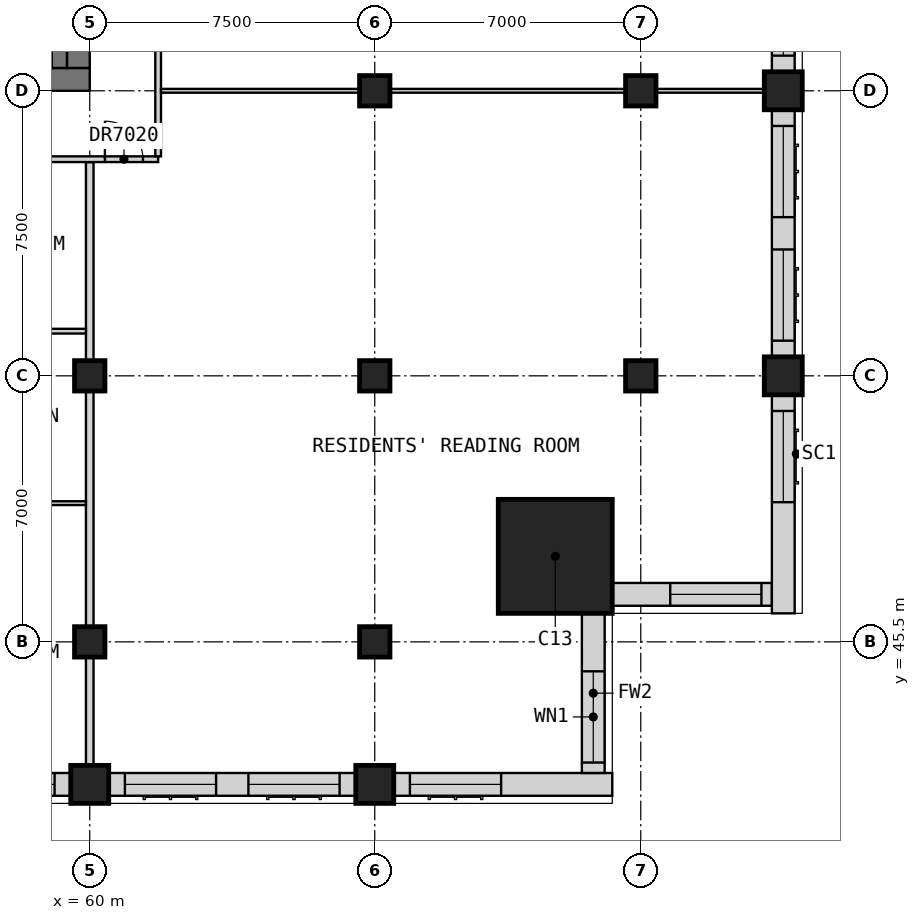
"""IFC4 building model, lengths in metres.
Left out: names, types, materials, properties, quantities, classifications, styles, units other than length and angle.
Written with IfcOpenShell. Run it as: python <this file> out.ifc"""

import sys

from ifc_helpers import new_model, si_unit, direction, frame, frame_2d, origin, origin_2d, place, context, subcontext, project, spatial, rectangle, extrude, element, fill, save


model = new_model("IFC4")
c1 = context("Model", 3, precision=1e-05, world=origin(), true_north=direction((0.0, 1.0)))
c2 = subcontext(c1, "Body", "Model", "MODEL_VIEW")
j1 = project(units=[si_unit("LENGTHUNIT", "METRE"), si_unit("PLANEANGLEUNIT", "RADIAN")], contexts=[c1])
p1 = place(None, origin())
s1 = spatial("IfcSite", under=j1, at=p1, CompositionType="ELEMENT")
p2 = place(p1, origin())
s2 = spatial("IfcBuilding", under=s1, at=p2, CompositionType="ELEMENT")
p3 = place(p2, frame((0.0, 0.0, 230.2)))
s3 = spatial("IfcBuildingStorey", under=s2, at=p3, CompositionType="ELEMENT", Elevation=230.2)
for number, where, z_axis, x_axis in (
    (1, (60.0, 41.75, 0.0), (0.0, 0.0, 1.0), (1.0, 0.0, 0.0)),
    (2, (67.5, 41.75, 0.0), (0.0, 0.0, 1.0), (1.0, 0.0, 0.0)),
    (3, (78.25, 52.5, 0.0), (0.0, 0.0, 1.0), (1.0, 0.0, 0.0)),
    (4, (78.25, 60.0, 0.0), (0.0, 0.0, 1.0), (1.0, 0.0, 0.0)),
):
    element("IfcColumn", number, at=place(p3, frame(where, z_axis=z_axis, x_axis=x_axis)), inside=s3, PredefinedType="COLUMN", context=c2, shape_type="SweptSolid", body=[
        extrude(rectangle(XDim=1.0, YDim=1.0, at=origin_2d()), origin(), (0.0, 0.0, 1.0), 3.5),
    ])
for number, where, z_axis, x_axis in (
    (5, (60.0, 45.5, 0.0), (0.0, 0.0, 1.0), (1.0, 0.0, 0.0)),
    (6, (60.0, 52.5, 0.0), (0.0, 0.0, 1.0), (1.0, 0.0, 0.0)),
    (7, (67.5, 45.5, 0.0), (0.0, 0.0, 1.0), (1.0, 0.0, 0.0)),
    (8, (67.5, 52.5, 0.0), (0.0, 0.0, 1.0), (1.0, 0.0, 0.0)),
    (9, (67.5, 60.0, 0.0), (0.0, 0.0, 1.0), (1.0, 0.0, 0.0)),
    (10, (74.5, 52.5, 0.0), (0.0, 0.0, 1.0), (1.0, 0.0, 0.0)),
    (11, (74.5, 60.0, 0.0), (0.0, 0.0, 1.0), (1.0, 0.0, 0.0)),
):
    element("IfcColumn", number, at=place(p3, frame(where, z_axis=z_axis, x_axis=x_axis)), inside=s3, PredefinedType="COLUMN", context=c2, shape_type="SweptSolid", body=[
        extrude(rectangle(XDim=0.8, YDim=0.8, at=origin_2d()), origin(), (0.0, 0.0, 1.0), 3.5),
    ])
p4 = place(p3, frame((72.25, 47.75, 0.0), z_axis=(0.0, 0.0, 1.0), x_axis=(1.0, 0.0, 0.0)))
e12 = element("IfcColumn", 12, at=p4, inside=s3, PredefinedType="COLUMN", context=c2, shape_type="SweptSolid", body=[
    extrude(rectangle(XDim=3.0, YDim=3.0, at=origin_2d()), origin(), (0.0, 0.0, 1.0), 3.5),
])
p5 = place(p3, frame((30.0, 60.3, 0.0), z_axis=(0.0, 0.0, 1.0), x_axis=(1.0, 0.0, 0.0)))
e13 = element("IfcWall", 13, at=p5, inside=s3, PredefinedType="SHEAR", context=c2, shape_type="SweptSolid", body=[
    extrude(rectangle(XDim=30.0, YDim=0.6, at=frame_2d((15.0, 0.0))), origin(), (0.0, 0.0, 1.0), 3.5),
])
p6 = place(p5, frame((21.9, 0.0, 0.0)))
e14 = element("IfcOpeningElement", 14, at=p6, cuts=e13, PredefinedType="OPENING", context=c2, shape_type="SweptSolid", body=[
    extrude(rectangle(XDim=1.8, YDim=2.1, at=frame_2d((0.9, 1.05))), frame((0.0, 0.31, 0.0), z_axis=(0.0, -1.0, 0.0), x_axis=(1.0, 0.0, 0.0)), (0.0, 0.0, 1.0), 0.62),
])
p7 = place(p5, frame((26.5, 0.0, 0.0)))
e15 = element("IfcOpeningElement", 15, at=p7, cuts=e13, PredefinedType="OPENING", context=c2, shape_type="SweptSolid", body=[
    extrude(rectangle(XDim=1.2, YDim=2.1, at=frame_2d((0.6, 1.05))), frame((0.0, 0.31, 0.0), z_axis=(0.0, -1.0, 0.0), x_axis=(1.0, 0.0, 0.0)), (0.0, 0.0, 1.0), 0.62),
])
p8 = place(p3, frame((59.7, 60.6, 0.0), z_axis=(0.0, 0.0, 1.0), x_axis=(0.0, 1.0, 0.0)))
e16 = element("IfcWall", 16, at=p8, inside=s3, PredefinedType="SHEAR", context=c2, shape_type="SweptSolid", body=[
    extrude(rectangle(XDim=21.3, YDim=0.6, at=frame_2d((10.65, 0.0))), origin(), (0.0, 0.0, 1.0), 3.5),
])
p9 = place(p8, frame((14.9, 0.0, 0.0)))
e17 = element("IfcOpeningElement", 17, at=p9, cuts=e16, PredefinedType="OPENING", context=c2, shape_type="SweptSolid", body=[
    extrude(rectangle(XDim=1.8, YDim=2.1, at=frame_2d((0.9, 1.05))), frame((0.0, 0.31, 0.0), z_axis=(0.0, -1.0, 0.0), x_axis=(1.0, 0.0, 0.0)), (0.0, 0.0, 1.0), 0.62),
])
p10 = place(p3, frame((53.0, 41.75, 0.0), z_axis=(0.0, 0.0, 1.0), x_axis=(1.0, 0.0, 0.0)))
e18 = element("IfcWall", 18, at=p10, inside=s3, PredefinedType="SOLIDWALL", context=c2, shape_type="SweptSolid", body=[
    extrude(rectangle(XDim=6.5, YDim=0.6, at=frame_2d((3.25, 0.0))), origin(), (0.0, 0.0, 1.0), 2.75),
])
p11 = place(p10, frame((0.425, 0.0, 0.8)))
e19 = element("IfcOpeningElement", 19, at=p11, cuts=e18, PredefinedType="OPENING", context=c2, shape_type="SweptSolid", body=[
    extrude(rectangle(XDim=2.4, YDim=1.8, at=frame_2d((1.2, 0.9))), frame((0.0, 0.31, 0.0), z_axis=(0.0, -1.0, 0.0), x_axis=(1.0, 0.0, 0.0)), (0.0, 0.0, 1.0), 0.62),
])
p12 = place(p10, frame((3.675, 0.0, 0.8)))
e20 = element("IfcOpeningElement", 20, at=p12, cuts=e18, PredefinedType="OPENING", context=c2, shape_type="SweptSolid", body=[
    extrude(rectangle(XDim=2.4, YDim=1.8, at=frame_2d((1.2, 0.9))), frame((0.0, 0.31, 0.0), z_axis=(0.0, -1.0, 0.0), x_axis=(1.0, 0.0, 0.0)), (0.0, 0.0, 1.0), 0.62),
])
p13 = place(p3, frame((60.5, 41.75, 0.0), z_axis=(0.0, 0.0, 1.0), x_axis=(1.0, 0.0, 0.0)))
e21 = element("IfcWall", 21, at=p13, inside=s3, PredefinedType="SOLIDWALL", context=c2, shape_type="SweptSolid", body=[
    extrude(rectangle(XDim=6.5, YDim=0.6, at=frame_2d((3.25, 0.0))), origin(), (0.0, 0.0, 1.0), 2.75),
])
p14 = place(p13, frame((0.425, 0.0, 0.8)))
e22 = element("IfcOpeningElement", 22, at=p14, cuts=e21, PredefinedType="OPENING", context=c2, shape_type="SweptSolid", body=[
    extrude(rectangle(XDim=2.4, YDim=1.8, at=frame_2d((1.2, 0.9))), frame((0.0, 0.31, 0.0), z_axis=(0.0, -1.0, 0.0), x_axis=(1.0, 0.0, 0.0)), (0.0, 0.0, 1.0), 0.62),
])
p15 = place(p13, frame((3.675, 0.0, 0.8)))
e23 = element("IfcOpeningElement", 23, at=p15, cuts=e21, PredefinedType="OPENING", context=c2, shape_type="SweptSolid", body=[
    extrude(rectangle(XDim=2.4, YDim=1.8, at=frame_2d((1.2, 0.9))), frame((0.0, 0.31, 0.0), z_axis=(0.0, -1.0, 0.0), x_axis=(1.0, 0.0, 0.0)), (0.0, 0.0, 1.0), 0.62),
])
p16 = place(p3, frame((68.0, 41.75, 0.0), z_axis=(0.0, 0.0, 1.0), x_axis=(1.0, 0.0, 0.0)))
e24 = element("IfcWall", 24, at=p16, inside=s3, PredefinedType="SOLIDWALL", context=c2, shape_type="SweptSolid", body=[
    extrude(rectangle(XDim=5.75, YDim=0.6, at=frame_2d((2.875, 0.0))), origin(), (0.0, 0.0, 1.0), 2.75),
])
p17 = place(p16, frame((0.425, 0.0, 0.8)))
e25 = element("IfcOpeningElement", 25, at=p17, cuts=e24, PredefinedType="OPENING", context=c2, shape_type="SweptSolid", body=[
    extrude(rectangle(XDim=2.4, YDim=1.8, at=frame_2d((1.2, 0.9))), frame((0.0, 0.31, 0.0), z_axis=(0.0, -1.0, 0.0), x_axis=(1.0, 0.0, 0.0)), (0.0, 0.0, 1.0), 0.62),
])
p18 = place(p3, frame((73.25, 42.05, 0.0), z_axis=(0.0, 0.0, 1.0), x_axis=(0.0, 1.0, 0.0)))
e26 = element("IfcWall", 26, at=p18, inside=s3, PredefinedType="SOLIDWALL", context=c2, shape_type="SweptSolid", body=[
    extrude(rectangle(XDim=4.2, YDim=0.6, at=frame_2d((2.1, 0.0))), origin(), (0.0, 0.0, 1.0), 3.25),
])
p19 = place(p18, frame((0.275, 0.0, 0.8)))
e27 = element("IfcOpeningElement", 27, at=p19, cuts=e26, PredefinedType="OPENING", context=c2, shape_type="SweptSolid", body=[
    extrude(rectangle(XDim=2.4, YDim=1.8, at=frame_2d((1.2, 0.9))), frame((0.0, 0.31, 0.0), z_axis=(0.0, -1.0, 0.0), x_axis=(1.0, 0.0, 0.0)), (0.0, 0.0, 1.0), 0.62),
])
p20 = place(p3, frame((73.75, 46.75, 0.0), z_axis=(0.0, 0.0, 1.0), x_axis=(1.0, 0.0, 0.0)))
e28 = element("IfcWall", 28, at=p20, inside=s3, PredefinedType="SOLIDWALL", context=c2, shape_type="SweptSolid", body=[
    extrude(rectangle(XDim=4.2, YDim=0.6, at=frame_2d((2.1, 0.0))), origin(), (0.0, 0.0, 1.0), 3.25),
])
p21 = place(p20, frame((1.525, 0.0, 0.8)))
e29 = element("IfcOpeningElement", 29, at=p21, cuts=e28, PredefinedType="OPENING", context=c2, shape_type="SweptSolid", body=[
    extrude(rectangle(XDim=2.4, YDim=1.8, at=frame_2d((1.2, 0.9))), frame((0.0, 0.31, 0.0), z_axis=(0.0, -1.0, 0.0), x_axis=(1.0, 0.0, 0.0)), (0.0, 0.0, 1.0), 0.62),
])
p22 = place(p3, frame((78.25, 46.25, 0.0), z_axis=(0.0, 0.0, 1.0), x_axis=(0.0, 1.0, 0.0)))
e30 = element("IfcWall", 30, at=p22, inside=s3, PredefinedType="SOLIDWALL", context=c2, shape_type="SweptSolid", body=[
    extrude(rectangle(XDim=5.75, YDim=0.6, at=frame_2d((2.875, 0.0))), origin(), (0.0, 0.0, 1.0), 2.75),
])
p23 = place(p22, frame((2.925, 0.0, 0.8)))
e31 = element("IfcOpeningElement", 31, at=p23, cuts=e30, PredefinedType="OPENING", context=c2, shape_type="SweptSolid", body=[
    extrude(rectangle(XDim=2.4, YDim=1.8, at=frame_2d((1.2, 0.9))), frame((0.0, 0.31, 0.0), z_axis=(0.0, -1.0, 0.0), x_axis=(1.0, 0.0, 0.0)), (0.0, 0.0, 1.0), 0.62),
])
p24 = place(p3, frame((78.25, 53.0, 0.0), z_axis=(0.0, 0.0, 1.0), x_axis=(0.0, 1.0, 0.0)))
e32 = element("IfcWall", 32, at=p24, inside=s3, PredefinedType="SOLIDWALL", context=c2, shape_type="SweptSolid", body=[
    extrude(rectangle(XDim=6.5, YDim=0.6, at=frame_2d((3.25, 0.0))), origin(), (0.0, 0.0, 1.0), 2.75),
])
p25 = place(p24, frame((0.425, 0.0, 0.8)))
e33 = element("IfcOpeningElement", 33, at=p25, cuts=e32, PredefinedType="OPENING", context=c2, shape_type="SweptSolid", body=[
    extrude(rectangle(XDim=2.4, YDim=1.8, at=frame_2d((1.2, 0.9))), frame((0.0, 0.31, 0.0), z_axis=(0.0, -1.0, 0.0), x_axis=(1.0, 0.0, 0.0)), (0.0, 0.0, 1.0), 0.62),
])
p26 = place(p24, frame((3.675, 0.0, 0.8)))
e34 = element("IfcOpeningElement", 34, at=p26, cuts=e32, PredefinedType="OPENING", context=c2, shape_type="SweptSolid", body=[
    extrude(rectangle(XDim=2.4, YDim=1.8, at=frame_2d((1.2, 0.9))), frame((0.0, 0.31, 0.0), z_axis=(0.0, -1.0, 0.0), x_axis=(1.0, 0.0, 0.0)), (0.0, 0.0, 1.0), 0.62),
])
p27 = place(p3, frame((78.25, 60.5, 0.0), z_axis=(0.0, 0.0, 1.0), x_axis=(0.0, 1.0, 0.0)))
e35 = element("IfcWall", 35, at=p27, inside=s3, PredefinedType="SOLIDWALL", context=c2, shape_type="SweptSolid", body=[
    extrude(rectangle(XDim=6.5, YDim=0.6, at=frame_2d((3.25, 0.0))), origin(), (0.0, 0.0, 1.0), 2.75),
])
p28 = place(p27, frame((0.425, 0.0, 0.8)))
e36 = element("IfcOpeningElement", 36, at=p28, cuts=e35, PredefinedType="OPENING", context=c2, shape_type="SweptSolid", body=[
    extrude(rectangle(XDim=2.4, YDim=1.8, at=frame_2d((1.2, 0.9))), frame((0.0, 0.31, 0.0), z_axis=(0.0, -1.0, 0.0), x_axis=(1.0, 0.0, 0.0)), (0.0, 0.0, 1.0), 0.62),
])
p29 = place(p27, frame((3.675, 0.0, 0.8)))
e37 = element("IfcOpeningElement", 37, at=p29, cuts=e35, PredefinedType="OPENING", context=c2, shape_type="SweptSolid", body=[
    extrude(rectangle(XDim=2.4, YDim=1.8, at=frame_2d((1.2, 0.9))), frame((0.0, 0.31, 0.0), z_axis=(0.0, -1.0, 0.0), x_axis=(1.0, 0.0, 0.0)), (0.0, 0.0, 1.0), 0.62),
])
p30 = place(p3, frame((59.2, 60.6, 0.0), z_axis=(0.0, 0.0, 1.0), x_axis=(0.0, 1.0, 0.0)))
e38 = element("IfcWall", 38, at=p30, inside=s3, PredefinedType="SOLIDWALL", context=c2, shape_type="SweptSolid", body=[
    extrude(rectangle(XDim=7.9, YDim=0.4, at=frame_2d((3.95, 0.0))), origin(), (0.0, 0.0, 1.0), 3.25),
])
p31 = place(p3, frame((60.0, 41.25, 0.0), z_axis=(0.0, 0.0, 1.0), x_axis=(0.0, 1.0, 0.0)))
e39 = element("IfcWall", 39, at=p31, inside=s3, PredefinedType="PARTITIONING", context=c2, shape_type="SweptSolid", body=[
    extrude(rectangle(XDim=16.875, YDim=0.2, at=frame_2d((8.438, 0.0))), origin(), (0.0, 0.0, 1.0), 3.25),
])
p32 = place(p3, frame((33.85, 58.2, 0.0), z_axis=(0.0, 0.0, 1.0), x_axis=(1.0, 0.0, 0.0)))
e40 = element("IfcWall", 40, at=p32, inside=s3, PredefinedType="PARTITIONING", context=c2, shape_type="SweptSolid", body=[
    extrude(rectangle(XDim=27.95, YDim=0.15, at=frame_2d((13.975, 0.0))), origin(), (0.0, 0.0, 1.0), 3.25),
])
p33 = place(p32, frame((1.325, 0.0, 0.0)))
e41 = element("IfcOpeningElement", 41, at=p33, cuts=e40, PredefinedType="OPENING", context=c2, shape_type="SweptSolid", body=[
    extrude(rectangle(XDim=0.9, YDim=2.1, at=frame_2d((0.45, 1.05))), frame((0.0, 0.085, 0.0), z_axis=(0.0, -1.0, 0.0), x_axis=(1.0, 0.0, 0.0)), (0.0, 0.0, 1.0), 0.17),
])
p34 = place(p32, frame((12.575, 0.0, 0.0)))
e42 = element("IfcOpeningElement", 42, at=p34, cuts=e40, PredefinedType="OPENING", context=c2, shape_type="SweptSolid", body=[
    extrude(rectangle(XDim=0.9, YDim=2.1, at=frame_2d((0.45, 1.05))), frame((0.0, 0.085, 0.0), z_axis=(0.0, -1.0, 0.0), x_axis=(1.0, 0.0, 0.0)), (0.0, 0.0, 1.0), 0.17),
])
p35 = place(p32, frame((20.075, 0.0, 0.0)))
e43 = element("IfcOpeningElement", 43, at=p35, cuts=e40, PredefinedType="OPENING", context=c2, shape_type="SweptSolid", body=[
    extrude(rectangle(XDim=0.9, YDim=2.1, at=frame_2d((0.45, 1.05))), frame((0.0, 0.085, 0.0), z_axis=(0.0, -1.0, 0.0), x_axis=(1.0, 0.0, 0.0)), (0.0, 0.0, 1.0), 0.17),
])
p36 = place(p32, frame((26.55, 0.0, 0.0)))
e44 = element("IfcOpeningElement", 44, at=p36, cuts=e40, PredefinedType="OPENING", context=c2, shape_type="SweptSolid", body=[
    extrude(rectangle(XDim=1.0, YDim=2.1, at=frame_2d((0.5, 1.05))), frame((0.0, 0.085, 0.0), z_axis=(0.0, -1.0, 0.0), x_axis=(1.0, 0.0, 0.0)), (0.0, 0.0, 1.0), 0.17),
])
p37 = place(p3, frame((61.8, 58.275, 0.0), z_axis=(0.0, 0.0, 1.0), x_axis=(0.0, 1.0, 0.0)))
e45 = element("IfcWall", 45, at=p37, inside=s3, PredefinedType="PARTITIONING", context=c2, shape_type="SweptSolid", body=[
    extrude(rectangle(XDim=25.95, YDim=0.15, at=frame_2d((12.975, 0.0))), origin(), (0.0, 0.0, 1.0), 3.25),
])
p38 = place(p37, frame((4.575, 0.0, 0.0)))
e46 = element("IfcOpeningElement", 46, at=p38, cuts=e45, PredefinedType="OPENING", context=c2, shape_type="SweptSolid", body=[
    extrude(rectangle(XDim=1.8, YDim=2.1, at=frame_2d((0.9, 1.05))), frame((0.0, 0.085, 0.0), z_axis=(0.0, -1.0, 0.0), x_axis=(1.0, 0.0, 0.0)), (0.0, 0.0, 1.0), 0.17),
])
p39 = place(p37, frame((14.4, 0.0, 0.0)))
e47 = element("IfcOpeningElement", 47, at=p39, cuts=e45, PredefinedType="OPENING", context=c2, shape_type="SweptSolid", body=[
    extrude(rectangle(XDim=0.9, YDim=2.1, at=frame_2d((0.45, 1.05))), frame((0.0, 0.085, 0.0), z_axis=(0.0, -1.0, 0.0), x_axis=(1.0, 0.0, 0.0)), (0.0, 0.0, 1.0), 0.17),
])
p40 = place(p3, frame((33.85, 49.15, 0.0), z_axis=(0.0, 0.0, 1.0), x_axis=(1.0, 0.0, 0.0)))
e48 = element("IfcWall", 48, at=p40, inside=s3, PredefinedType="PARTITIONING", context=c2, shape_type="SweptSolid", body=[
    extrude(rectangle(XDim=26.05, YDim=0.1, at=frame_2d((13.025, 0.0))), origin(), (0.0, 0.0, 1.0), 3.25),
])
p41 = place(p40, frame((0.175, 0.0, 0.0)))
e49 = element("IfcOpeningElement", 49, at=p41, cuts=e48, PredefinedType="OPENING", context=c2, shape_type="SweptSolid", body=[
    extrude(rectangle(XDim=0.9, YDim=2.1, at=frame_2d((0.45, 1.05))), frame((0.0, 0.06, 0.0), z_axis=(0.0, -1.0, 0.0), x_axis=(1.0, 0.0, 0.0)), (0.0, 0.0, 1.0), 0.12),
])
p42 = place(p40, frame((8.825, 0.0, 0.0)))
e50 = element("IfcOpeningElement", 50, at=p42, cuts=e48, PredefinedType="OPENING", context=c2, shape_type="SweptSolid", body=[
    extrude(rectangle(XDim=0.9, YDim=2.1, at=frame_2d((0.45, 1.05))), frame((0.0, 0.06, 0.0), z_axis=(0.0, -1.0, 0.0), x_axis=(1.0, 0.0, 0.0)), (0.0, 0.0, 1.0), 0.12),
])
p43 = place(p40, frame((12.575, 0.0, 0.0)))
e51 = element("IfcOpeningElement", 51, at=p43, cuts=e48, PredefinedType="OPENING", context=c2, shape_type="SweptSolid", body=[
    extrude(rectangle(XDim=0.9, YDim=2.1, at=frame_2d((0.45, 1.05))), frame((0.0, 0.06, 0.0), z_axis=(0.0, -1.0, 0.0), x_axis=(1.0, 0.0, 0.0)), (0.0, 0.0, 1.0), 0.12),
])
p44 = place(p40, frame((20.075, 0.0, 0.0)))
e52 = element("IfcOpeningElement", 52, at=p44, cuts=e48, PredefinedType="OPENING", context=c2, shape_type="SweptSolid", body=[
    extrude(rectangle(XDim=0.9, YDim=2.1, at=frame_2d((0.45, 1.05))), frame((0.0, 0.06, 0.0), z_axis=(0.0, -1.0, 0.0), x_axis=(1.0, 0.0, 0.0)), (0.0, 0.0, 1.0), 0.12),
])
p45 = place(p3, frame((61.875, 60.0, 0.0), z_axis=(0.0, 0.0, 1.0), x_axis=(1.0, 0.0, 0.0)))
e53 = element("IfcWall", 53, at=p45, inside=s3, PredefinedType="PARTITIONING", context=c2, shape_type="SweptSolid", body=[
    extrude(rectangle(XDim=16.875, YDim=0.1, at=frame_2d((8.438, 0.0))), origin(), (0.0, 0.0, 1.0), 3.25),
])
p46 = place(p3, frame((56.25, 53.675, 0.0), z_axis=(0.0, 0.0, 1.0), x_axis=(1.0, 0.0, 0.0)))
e54 = element("IfcWall", 54, at=p46, inside=s3, PredefinedType="PARTITIONING", context=c2, shape_type="SweptSolid", body=[
    extrude(rectangle(XDim=3.65, YDim=0.125, at=frame_2d((1.825, 0.0))), origin(), (0.0, 0.0, 1.0), 3.25),
])
p47 = place(p12, origin())
e55 = element("IfcWindow", 55, at=p47, inside=s3, PartitioningType="SINGLE_PANEL", PredefinedType="WINDOW", context=c2, shape_type="SweptSolid", body=[
    extrude(rectangle(XDim=2.4, YDim=1.8, at=frame_2d((1.2, 0.9))), frame((0.0, -0.07, 0.0), z_axis=(0.0, -1.0, 0.0), x_axis=(1.0, 0.0, 0.0)), (0.0, 0.0, 1.0), 0.06),
])
fill(e20, e55)
p48 = place(p14, origin())
e56 = element("IfcWindow", 56, at=p48, inside=s3, PartitioningType="SINGLE_PANEL", PredefinedType="WINDOW", context=c2, shape_type="SweptSolid", body=[
    extrude(rectangle(XDim=2.4, YDim=1.8, at=frame_2d((1.2, 0.9))), frame((0.0, -0.07, 0.0), z_axis=(0.0, -1.0, 0.0), x_axis=(1.0, 0.0, 0.0)), (0.0, 0.0, 1.0), 0.06),
])
fill(e22, e56)
p49 = place(p15, origin())
e57 = element("IfcWindow", 57, at=p49, inside=s3, PartitioningType="SINGLE_PANEL", PredefinedType="WINDOW", context=c2, shape_type="SweptSolid", body=[
    extrude(rectangle(XDim=2.4, YDim=1.8, at=frame_2d((1.2, 0.9))), frame((0.0, -0.07, 0.0), z_axis=(0.0, -1.0, 0.0), x_axis=(1.0, 0.0, 0.0)), (0.0, 0.0, 1.0), 0.06),
])
fill(e23, e57)
p50 = place(p17, origin())
e58 = element("IfcWindow", 58, at=p50, inside=s3, PartitioningType="SINGLE_PANEL", PredefinedType="WINDOW", context=c2, shape_type="SweptSolid", body=[
    extrude(rectangle(XDim=2.4, YDim=1.8, at=frame_2d((1.2, 0.9))), frame((0.0, -0.07, 0.0), z_axis=(0.0, -1.0, 0.0), x_axis=(1.0, 0.0, 0.0)), (0.0, 0.0, 1.0), 0.06),
])
fill(e25, e58)
p51 = place(p19, origin())
e59 = element("IfcWindow", 59, at=p51, inside=s3, PartitioningType="SINGLE_PANEL", PredefinedType="WINDOW", context=c2, shape_type="SweptSolid", body=[
    extrude(rectangle(XDim=2.4, YDim=1.8, at=frame_2d((1.2, 0.9))), frame((0.0, -0.07, 0.0), z_axis=(0.0, -1.0, 0.0), x_axis=(1.0, 0.0, 0.0)), (0.0, 0.0, 1.0), 0.06),
])
fill(e27, e59)
p52 = place(p21, origin())
e60 = element("IfcWindow", 60, at=p52, inside=s3, PartitioningType="SINGLE_PANEL", PredefinedType="WINDOW", context=c2, shape_type="SweptSolid", body=[
    extrude(rectangle(XDim=2.4, YDim=1.8, at=frame_2d((1.2, 0.9))), frame((0.0, -0.07, 0.0), z_axis=(0.0, -1.0, 0.0), x_axis=(1.0, 0.0, 0.0)), (0.0, 0.0, 1.0), 0.06),
])
fill(e29, e60)
p53 = place(p23, origin())
e61 = element("IfcWindow", 61, at=p53, inside=s3, PartitioningType="SINGLE_PANEL", PredefinedType="WINDOW", context=c2, shape_type="SweptSolid", body=[
    extrude(rectangle(XDim=2.4, YDim=1.8, at=frame_2d((1.2, 0.9))), frame((0.0, -0.07, 0.0), z_axis=(0.0, -1.0, 0.0), x_axis=(1.0, 0.0, 0.0)), (0.0, 0.0, 1.0), 0.06),
])
fill(e31, e61)
p54 = place(p25, origin())
e62 = element("IfcWindow", 62, at=p54, inside=s3, PartitioningType="SINGLE_PANEL", PredefinedType="WINDOW", context=c2, shape_type="SweptSolid", body=[
    extrude(rectangle(XDim=2.4, YDim=1.8, at=frame_2d((1.2, 0.9))), frame((0.0, -0.07, 0.0), z_axis=(0.0, -1.0, 0.0), x_axis=(1.0, 0.0, 0.0)), (0.0, 0.0, 1.0), 0.06),
])
fill(e33, e62)
p55 = place(p26, origin())
e63 = element("IfcWindow", 63, at=p55, inside=s3, PartitioningType="SINGLE_PANEL", PredefinedType="WINDOW", context=c2, shape_type="SweptSolid", body=[
    extrude(rectangle(XDim=2.4, YDim=1.8, at=frame_2d((1.2, 0.9))), frame((0.0, -0.07, 0.0), z_axis=(0.0, -1.0, 0.0), x_axis=(1.0, 0.0, 0.0)), (0.0, 0.0, 1.0), 0.06),
])
fill(e34, e63)
p56 = place(p28, origin())
e64 = element("IfcWindow", 64, at=p56, inside=s3, PartitioningType="SINGLE_PANEL", PredefinedType="WINDOW", context=c2, shape_type="SweptSolid", body=[
    extrude(rectangle(XDim=2.4, YDim=1.8, at=frame_2d((1.2, 0.9))), frame((0.0, -0.07, 0.0), z_axis=(0.0, -1.0, 0.0), x_axis=(1.0, 0.0, 0.0)), (0.0, 0.0, 1.0), 0.06),
])
fill(e36, e64)
p57 = place(p36, origin())
e65 = element("IfcDoor", 65, at=p57, inside=s3, OperationType="SINGLE_SWING_RIGHT", PredefinedType="DOOR", context=c2, shape_type="SweptSolid", body=[
    extrude(rectangle(XDim=1.0, YDim=2.1, at=frame_2d((0.5, 1.05))), frame((0.0, 0.025, 0.0), z_axis=(0.0, -1.0, 0.0), x_axis=(1.0, 0.0, 0.0)), (0.0, 0.0, 1.0), 0.05),
])
fill(e44, e65)
save(model, sys.argv[1])
